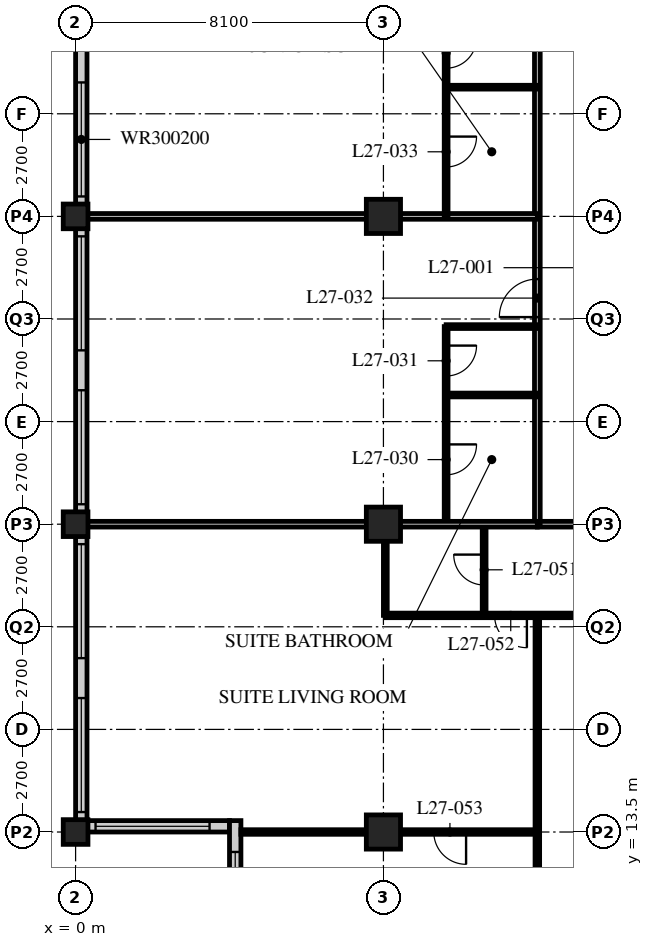
"""IFC4 building model, lengths in metres.
Left out: names, types, materials, properties, quantities, classifications, styles, units other than length and angle.
Written with IfcOpenShell. Run it as: python <this file> out.ifc"""

import sys

from ifc_helpers import new_model, si_unit, direction, frame, frame_2d, origin, origin_2d, place, context, subcontext, project, spatial, rectangle, hollow_rectangle, extrude, element, fill, save


model = new_model("IFC4")
c1 = context("Model", 3, precision=1e-05, world=origin(), true_north=direction((0.0, 1.0)))
c2 = subcontext(c1, "Body", "Model", "MODEL_VIEW")
j1 = project(units=[si_unit("LENGTHUNIT", "METRE"), si_unit("PLANEANGLEUNIT", "RADIAN")], contexts=[c1])
p1 = place(None, origin())
s1 = spatial("IfcSite", under=j1, at=p1, CompositionType="ELEMENT")
p2 = place(p1, origin())
s2 = spatial("IfcBuilding", under=s1, at=p2, CompositionType="ELEMENT")
p3 = place(p2, frame((0.0, 0.0, 110.2)))
s3 = spatial("IfcBuildingStorey", under=s2, at=p3, CompositionType="ELEMENT", Elevation=110.2)
for number, where, z_axis, x_axis in (
    (1, (0.0, 13.5, 0.0), (0.0, 0.0, 1.0), (1.0, 0.0, 0.0)),
    (2, (0.0, 21.6, 0.0), (0.0, 0.0, 1.0), (1.0, 0.0, 0.0)),
    (3, (0.0, 29.7, 0.0), (0.0, 0.0, 1.0), (1.0, 0.0, 0.0)),
):
    element("IfcColumn", number, at=place(p3, frame(where, z_axis=z_axis, x_axis=x_axis)), inside=s3, PredefinedType="COLUMN", context=c2, shape_type="SweptSolid", body=[
        extrude(hollow_rectangle(XDim=0.65, YDim=0.65, WallThickness=0.055, at=origin_2d()), origin(), (0.0, 0.0, 1.0), 3.4),
    ])
for number, where, z_axis, x_axis in (
    (4, (8.1, 13.5, 0.0), (0.0, 0.0, 1.0), (1.0, 0.0, 0.0)),
    (5, (8.1, 21.6, 0.0), (0.0, 0.0, 1.0), (1.0, 0.0, 0.0)),
    (6, (8.1, 29.7, 0.0), (0.0, 0.0, 1.0), (1.0, 0.0, 0.0)),
):
    element("IfcColumn", number, at=place(p3, frame(where, z_axis=z_axis, x_axis=x_axis)), inside=s3, PredefinedType="COLUMN", context=c2, shape_type="SweptSolid", body=[
        extrude(hollow_rectangle(XDim=0.9, YDim=0.9, WallThickness=0.09, at=origin_2d()), origin(), (0.0, 0.0, 1.0), 3.4),
    ])
p4 = place(p3, frame((0.15, 45.6, 0.0), z_axis=(0.0, 0.0, 1.0), x_axis=(0.0, -1.0, 0.0)))
e7 = element("IfcWall", 7, at=p4, inside=s3, PredefinedType="SOLIDWALL", context=c2, shape_type="SweptSolid", body=[
    extrude(rectangle(XDim=32.1, YDim=0.3, at=frame_2d((16.05, 0.0))), origin(), (0.0, 0.0, 1.0), 3.19),
])
p5 = place(p4, frame((0.225, 0.0, 0.9)))
e8 = element("IfcOpeningElement", 8, at=p5, cuts=e7, PredefinedType="OPENING", context=c2, shape_type="SweptSolid", body=[
    extrude(rectangle(XDim=3.0, YDim=2.0, at=frame_2d((1.5, 1.0))), frame((0.0, 0.16, 0.0), z_axis=(0.0, -1.0, 0.0), x_axis=(1.0, 0.0, 0.0)), (0.0, 0.0, 1.0), 0.32),
])
p6 = place(p4, frame((4.275, 0.0, 0.9)))
e9 = element("IfcOpeningElement", 9, at=p6, cuts=e7, PredefinedType="OPENING", context=c2, shape_type="SweptSolid", body=[
    extrude(rectangle(XDim=3.0, YDim=2.0, at=frame_2d((1.5, 1.0))), frame((0.0, 0.16, 0.0), z_axis=(0.0, -1.0, 0.0), x_axis=(1.0, 0.0, 0.0)), (0.0, 0.0, 1.0), 0.32),
])
p7 = place(p4, frame((8.325, 0.0, 0.9)))
e10 = element("IfcOpeningElement", 10, at=p7, cuts=e7, PredefinedType="OPENING", context=c2, shape_type="SweptSolid", body=[
    extrude(rectangle(XDim=3.0, YDim=2.0, at=frame_2d((1.5, 1.0))), frame((0.0, 0.16, 0.0), z_axis=(0.0, -1.0, 0.0), x_axis=(1.0, 0.0, 0.0)), (0.0, 0.0, 1.0), 0.32),
])
p8 = place(p4, frame((12.375, 0.0, 0.9)))
e11 = element("IfcOpeningElement", 11, at=p8, cuts=e7, PredefinedType="OPENING", context=c2, shape_type="SweptSolid", body=[
    extrude(rectangle(XDim=3.0, YDim=2.0, at=frame_2d((1.5, 1.0))), frame((0.0, 0.16, 0.0), z_axis=(0.0, -1.0, 0.0), x_axis=(1.0, 0.0, 0.0)), (0.0, 0.0, 1.0), 0.32),
])
p9 = place(p4, frame((16.425, 0.0, 0.9)))
e12 = element("IfcOpeningElement", 12, at=p9, cuts=e7, PredefinedType="OPENING", context=c2, shape_type="SweptSolid", body=[
    extrude(rectangle(XDim=3.0, YDim=2.0, at=frame_2d((1.5, 1.0))), frame((0.0, 0.16, 0.0), z_axis=(0.0, -1.0, 0.0), x_axis=(1.0, 0.0, 0.0)), (0.0, 0.0, 1.0), 0.32),
])
p10 = place(p4, frame((20.475, 0.0, 0.9)))
e13 = element("IfcOpeningElement", 13, at=p10, cuts=e7, PredefinedType="OPENING", context=c2, shape_type="SweptSolid", body=[
    extrude(rectangle(XDim=3.0, YDim=2.0, at=frame_2d((1.5, 1.0))), frame((0.0, 0.16, 0.0), z_axis=(0.0, -1.0, 0.0), x_axis=(1.0, 0.0, 0.0)), (0.0, 0.0, 1.0), 0.32),
])
p11 = place(p4, frame((24.525, 0.0, 0.9)))
e14 = element("IfcOpeningElement", 14, at=p11, cuts=e7, PredefinedType="OPENING", context=c2, shape_type="SweptSolid", body=[
    extrude(rectangle(XDim=3.0, YDim=2.0, at=frame_2d((1.5, 1.0))), frame((0.0, 0.16, 0.0), z_axis=(0.0, -1.0, 0.0), x_axis=(1.0, 0.0, 0.0)), (0.0, 0.0, 1.0), 0.32),
])
p12 = place(p4, frame((28.575, 0.0, 0.9)))
e15 = element("IfcOpeningElement", 15, at=p12, cuts=e7, PredefinedType="OPENING", context=c2, shape_type="SweptSolid", body=[
    extrude(rectangle(XDim=3.0, YDim=2.0, at=frame_2d((1.5, 1.0))), frame((0.0, 0.16, 0.0), z_axis=(0.0, -1.0, 0.0), x_axis=(1.0, 0.0, 0.0)), (0.0, 0.0, 1.0), 0.32),
])
p13 = place(p3, frame((0.3, 13.65, 0.0), z_axis=(0.0, 0.0, 1.0), x_axis=(1.0, 0.0, 0.0)))
e16 = element("IfcWall", 16, at=p13, inside=s3, PredefinedType="SOLIDWALL", context=c2, shape_type="SweptSolid", body=[
    extrude(rectangle(XDim=3.75, YDim=0.3, at=frame_2d((1.875, 0.0))), origin(), (0.0, 0.0, 1.0), 3.19),
])
p14 = place(p13, frame((0.225, 0.0, 0.9)))
e17 = element("IfcOpeningElement", 17, at=p14, cuts=e16, PredefinedType="OPENING", context=c2, shape_type="SweptSolid", body=[
    extrude(rectangle(XDim=3.0, YDim=1.5, at=frame_2d((1.5, 0.75))), frame((0.0, 0.16, 0.0), z_axis=(0.0, -1.0, 0.0), x_axis=(1.0, 0.0, 0.0)), (0.0, 0.0, 1.0), 0.32),
])
p15 = place(p3, frame((4.2, 13.8, 0.0), z_axis=(0.0, 0.0, 1.0), x_axis=(0.0, -1.0, 0.0)))
e18 = element("IfcWall", 18, at=p15, inside=s3, PredefinedType="SOLIDWALL", context=c2, shape_type="SweptSolid", body=[
    extrude(rectangle(XDim=4.35, YDim=0.3, at=frame_2d((2.175, 0.0))), origin(), (0.0, 0.0, 1.0), 3.19),
])
p16 = place(p15, frame((0.825, 0.0, 0.9)))
e19 = element("IfcOpeningElement", 19, at=p16, cuts=e18, PredefinedType="OPENING", context=c2, shape_type="SweptSolid", body=[
    extrude(rectangle(XDim=3.0, YDim=1.5, at=frame_2d((1.5, 0.75))), frame((0.0, 0.16, 0.0), z_axis=(0.0, -1.0, 0.0), x_axis=(1.0, 0.0, 0.0)), (0.0, 0.0, 1.0), 0.32),
])
p17 = place(p3, frame((12.15, 21.6, 0.0), z_axis=(0.0, 0.0, 1.0), x_axis=(1.0, 0.0, 0.0)))
e20 = element("IfcWall", 20, at=p17, inside=s3, PredefinedType="PARTITIONING", context=c2, shape_type="SweptSolid", body=[
    extrude(rectangle(XDim=32.4, YDim=0.15, at=frame_2d((16.2, 0.0))), origin(), (0.0, 0.0, 1.0), 2.578),
])
p18 = place(p17, frame((5.95, 0.0, 0.0)))
e21 = element("IfcOpeningElement", 21, at=p18, cuts=e20, PredefinedType="OPENING", context=c2, shape_type="SweptSolid", body=[
    extrude(rectangle(XDim=1.0, YDim=2.1, at=frame_2d((0.5, 1.05))), frame((0.0, 0.085, 0.0), z_axis=(0.0, -1.0, 0.0), x_axis=(1.0, 0.0, 0.0)), (0.0, 0.0, 1.0), 0.17),
])
p19 = place(p17, frame((14.05, 0.0, 0.0)))
e22 = element("IfcOpeningElement", 22, at=p19, cuts=e20, PredefinedType="OPENING", context=c2, shape_type="SweptSolid", body=[
    extrude(rectangle(XDim=1.0, YDim=2.1, at=frame_2d((0.5, 1.05))), frame((0.0, 0.085, 0.0), z_axis=(0.0, -1.0, 0.0), x_axis=(1.0, 0.0, 0.0)), (0.0, 0.0, 1.0), 0.17),
])
p20 = place(p17, frame((22.15, 0.0, 0.0)))
e23 = element("IfcOpeningElement", 23, at=p20, cuts=e20, PredefinedType="OPENING", context=c2, shape_type="SweptSolid", body=[
    extrude(rectangle(XDim=1.0, YDim=2.1, at=frame_2d((0.5, 1.05))), frame((0.0, 0.085, 0.0), z_axis=(0.0, -1.0, 0.0), x_axis=(1.0, 0.0, 0.0)), (0.0, 0.0, 1.0), 0.17),
])
p21 = place(p17, frame((1.525, 0.0, 0.0)))
e24 = element("IfcOpeningElement", 24, at=p21, cuts=e20, PredefinedType="OPENING", context=c2, shape_type="SweptSolid", body=[
    extrude(rectangle(XDim=1.0, YDim=2.1, at=frame_2d((0.5, 1.05))), frame((0.0, 0.085, 0.0), z_axis=(0.0, -1.0, 0.0), x_axis=(1.0, 0.0, 0.0)), (0.0, 0.0, 1.0), 0.17),
])
p22 = place(p17, frame((29.875, 0.0, 0.0)))
e25 = element("IfcOpeningElement", 25, at=p22, cuts=e20, PredefinedType="OPENING", context=c2, shape_type="SweptSolid", body=[
    extrude(rectangle(XDim=1.0, YDim=2.1, at=frame_2d((0.5, 1.05))), frame((0.0, 0.085, 0.0), z_axis=(0.0, -1.0, 0.0), x_axis=(1.0, 0.0, 0.0)), (0.0, 0.0, 1.0), 0.17),
])
p23 = place(p3, frame((12.15, 21.6, 0.0), z_axis=(0.0, 0.0, 1.0), x_axis=(0.0, 1.0, 0.0)))
e26 = element("IfcWall", 26, at=p23, inside=s3, PredefinedType="PARTITIONING", context=c2, shape_type="SweptSolid", body=[
    extrude(rectangle(XDim=24.3, YDim=0.15, at=frame_2d((12.15, 0.0))), origin(), (0.0, 0.0, 1.0), 3.19),
])
p24 = place(p23, frame((5.45, 0.0, 0.0)))
e27 = element("IfcOpeningElement", 27, at=p24, cuts=e26, PredefinedType="OPENING", context=c2, shape_type="SweptSolid", body=[
    extrude(rectangle(XDim=1.0, YDim=2.1, at=frame_2d((0.5, 1.05))), frame((0.0, 0.085, 0.0), z_axis=(0.0, -1.0, 0.0), x_axis=(1.0, 0.0, 0.0)), (0.0, 0.0, 1.0), 0.17),
])
p25 = place(p23, frame((13.55, 0.0, 0.0)))
e28 = element("IfcOpeningElement", 28, at=p25, cuts=e26, PredefinedType="OPENING", context=c2, shape_type="SweptSolid", body=[
    extrude(rectangle(XDim=1.0, YDim=2.1, at=frame_2d((0.5, 1.05))), frame((0.0, 0.085, 0.0), z_axis=(0.0, -1.0, 0.0), x_axis=(1.0, 0.0, 0.0)), (0.0, 0.0, 1.0), 0.17),
])
p26 = place(p23, frame((21.65, 0.0, 0.0)))
e29 = element("IfcOpeningElement", 29, at=p26, cuts=e26, PredefinedType="OPENING", context=c2, shape_type="SweptSolid", body=[
    extrude(rectangle(XDim=1.0, YDim=2.1, at=frame_2d((0.5, 1.05))), frame((0.0, 0.085, 0.0), z_axis=(0.0, -1.0, 0.0), x_axis=(1.0, 0.0, 0.0)), (0.0, 0.0, 1.0), 0.17),
])
p27 = place(p3, frame((9.75, 21.6, 0.0), z_axis=(0.0, 0.0, 1.0), x_axis=(0.0, 1.0, 0.0)))
e30 = element("IfcWall", 30, at=p27, inside=s3, PredefinedType="PARTITIONING", context=c2, shape_type="SweptSolid", body=[
    extrude(rectangle(XDim=5.2, YDim=0.1, at=frame_2d((2.6, 0.0))), origin(), (0.0, 0.0, 1.0), 3.19),
])
p28 = place(p27, frame((1.3, 0.0, 0.0)))
e31 = element("IfcOpeningElement", 31, at=p28, cuts=e30, PredefinedType="OPENING", context=c2, shape_type="SweptSolid", body=[
    extrude(rectangle(XDim=0.8, YDim=2.1, at=frame_2d((0.4, 1.05))), frame((0.0, 0.06, 0.0), z_axis=(0.0, -1.0, 0.0), x_axis=(1.0, 0.0, 0.0)), (0.0, 0.0, 1.0), 0.12),
])
p29 = place(p27, frame((3.9, 0.0, 0.0)))
e32 = element("IfcOpeningElement", 32, at=p29, cuts=e30, PredefinedType="OPENING", context=c2, shape_type="SweptSolid", body=[
    extrude(rectangle(XDim=0.8, YDim=2.1, at=frame_2d((0.4, 1.05))), frame((0.0, 0.06, 0.0), z_axis=(0.0, -1.0, 0.0), x_axis=(1.0, 0.0, 0.0)), (0.0, 0.0, 1.0), 0.12),
])
for number, where, z_axis, x_axis in (
    (33, (12.15, 25.0, 0.0), (0.0, 0.0, 1.0), (-1.0, 0.0, 0.0)),
    (34, (12.15, 26.8, 0.0), (0.0, 0.0, 1.0), (-1.0, 0.0, 0.0)),
):
    element("IfcWall", number, at=place(p3, frame(where, z_axis=z_axis, x_axis=x_axis)), inside=s3, PredefinedType="PARTITIONING", context=c2, shape_type="SweptSolid", body=[
        extrude(rectangle(XDim=2.4, YDim=0.1, at=frame_2d((1.2, 0.0))), origin(), (0.0, 0.0, 1.0), 3.19),
    ])
p30 = place(p3, frame((12.15, 29.7, 0.0), z_axis=(0.0, 0.0, 1.0), x_axis=(-1.0, 0.0, 0.0)))
e35 = element("IfcWall", 35, at=p30, inside=s3, PredefinedType="PARTITIONING", context=c2, shape_type="SweptSolid", body=[
    extrude(rectangle(XDim=11.85, YDim=0.15, at=frame_2d((5.925, 0.0))), origin(), (0.0, 0.0, 1.0), 2.578),
])
p31 = place(p3, frame((9.75, 29.7, 0.0), z_axis=(0.0, 0.0, 1.0), x_axis=(0.0, 1.0, 0.0)))
e36 = element("IfcWall", 36, at=p31, inside=s3, PredefinedType="PARTITIONING", context=c2, shape_type="SweptSolid", body=[
    extrude(rectangle(XDim=5.2, YDim=0.1, at=frame_2d((2.6, 0.0))), origin(), (0.0, 0.0, 1.0), 3.19),
])
p32 = place(p31, frame((1.3, 0.0, 0.0)))
e37 = element("IfcOpeningElement", 37, at=p32, cuts=e36, PredefinedType="OPENING", context=c2, shape_type="SweptSolid", body=[
    extrude(rectangle(XDim=0.8, YDim=2.1, at=frame_2d((0.4, 1.05))), frame((0.0, 0.06, 0.0), z_axis=(0.0, -1.0, 0.0), x_axis=(1.0, 0.0, 0.0)), (0.0, 0.0, 1.0), 0.12),
])
p33 = place(p31, frame((3.9, 0.0, 0.0)))
e38 = element("IfcOpeningElement", 38, at=p33, cuts=e36, PredefinedType="OPENING", context=c2, shape_type="SweptSolid", body=[
    extrude(rectangle(XDim=0.8, YDim=2.1, at=frame_2d((0.4, 1.05))), frame((0.0, 0.06, 0.0), z_axis=(0.0, -1.0, 0.0), x_axis=(1.0, 0.0, 0.0)), (0.0, 0.0, 1.0), 0.12),
])
p34 = place(p3, frame((12.15, 33.1, 0.0), z_axis=(0.0, 0.0, 1.0), x_axis=(-1.0, 0.0, 0.0)))
e39 = element("IfcWall", 39, at=p34, inside=s3, PredefinedType="PARTITIONING", context=c2, shape_type="SweptSolid", body=[
    extrude(rectangle(XDim=2.4, YDim=0.1, at=frame_2d((1.2, 0.0))), origin(), (0.0, 0.0, 1.0), 3.19),
])
p35 = place(p3, frame((10.75, 21.6, 0.0), z_axis=(0.0, 0.0, 1.0), x_axis=(0.0, -1.0, 0.0)))
e40 = element("IfcWall", 40, at=p35, inside=s3, PredefinedType="PARTITIONING", context=c2, shape_type="SweptSolid", body=[
    extrude(rectangle(XDim=2.4, YDim=0.1, at=frame_2d((1.2, 0.0))), origin(), (0.0, 0.0, 1.0), 3.19),
])
p36 = place(p35, frame((0.8, 0.0, 0.0)))
e41 = element("IfcOpeningElement", 41, at=p36, cuts=e40, PredefinedType="OPENING", context=c2, shape_type="SweptSolid", body=[
    extrude(rectangle(XDim=0.8, YDim=2.1, at=frame_2d((0.4, 1.05))), frame((0.0, 0.06, 0.0), z_axis=(0.0, -1.0, 0.0), x_axis=(1.0, 0.0, 0.0)), (0.0, 0.0, 1.0), 0.12),
])
p37 = place(p3, frame((8.15, 21.6, 0.0), z_axis=(0.0, 0.0, 1.0), x_axis=(0.0, -1.0, 0.0)))
e42 = element("IfcWall", 42, at=p37, inside=s3, PredefinedType="PARTITIONING", context=c2, shape_type="SweptSolid", body=[
    extrude(rectangle(XDim=2.4, YDim=0.1, at=frame_2d((1.2, 0.0))), origin(), (0.0, 0.0, 1.0), 2.578),
])
p38 = place(p3, frame((8.15, 19.2, 0.0), z_axis=(0.0, 0.0, 1.0), x_axis=(1.0, 0.0, 0.0)))
e43 = element("IfcWall", 43, at=p38, inside=s3, PredefinedType="PARTITIONING", context=c2, shape_type="SweptSolid", body=[
    extrude(rectangle(XDim=8.05, YDim=0.12, at=frame_2d((4.025, 0.0))), origin(), (0.0, 0.0, 1.0), 3.19),
])
p39 = place(p38, frame((6.725, 0.0, 0.0)))
e44 = element("IfcOpeningElement", 44, at=p39, cuts=e43, PredefinedType="OPENING", context=c2, shape_type="SweptSolid", body=[
    extrude(rectangle(XDim=0.85, YDim=2.1, at=frame_2d((0.425, 1.05))), frame((0.0, 0.07, 0.0), z_axis=(0.0, -1.0, 0.0), x_axis=(1.0, 0.0, 0.0)), (0.0, 0.0, 1.0), 0.14),
])
p40 = place(p38, frame((2.875, 0.0, 0.0)))
e45 = element("IfcOpeningElement", 45, at=p40, cuts=e43, PredefinedType="OPENING", context=c2, shape_type="SweptSolid", body=[
    extrude(rectangle(XDim=0.85, YDim=2.1, at=frame_2d((0.425, 1.05))), frame((0.0, 0.07, 0.0), z_axis=(0.0, -1.0, 0.0), x_axis=(1.0, 0.0, 0.0)), (0.0, 0.0, 1.0), 0.14),
])
p41 = place(p3, frame((12.15, 19.2, 0.0), z_axis=(0.0, 0.0, 1.0), x_axis=(0.0, -1.0, 0.0)))
e46 = element("IfcWall", 46, at=p41, inside=s3, PredefinedType="PARTITIONING", context=c2, shape_type="SweptSolid", body=[
    extrude(rectangle(XDim=13.5, YDim=0.12, at=frame_2d((6.75, 0.0))), origin(), (0.0, 0.0, 1.0), 3.19),
])
p42 = place(p3, frame((12.15, 13.5, 0.0), z_axis=(0.0, 0.0, 1.0), x_axis=(-1.0, 0.0, 0.0)))
e47 = element("IfcWall", 47, at=p42, inside=s3, PredefinedType="PARTITIONING", context=c2, shape_type="SweptSolid", body=[
    extrude(rectangle(XDim=7.8, YDim=0.12, at=frame_2d((3.9, 0.0))), origin(), (0.0, 0.0, 1.0), 2.578),
])
p43 = place(p42, frame((1.875, 0.0, 0.0)))
e48 = element("IfcOpeningElement", 48, at=p43, cuts=e47, PredefinedType="OPENING", context=c2, shape_type="SweptSolid", body=[
    extrude(rectangle(XDim=0.85, YDim=2.1, at=frame_2d((0.425, 1.05))), frame((0.0, 0.07, 0.0), z_axis=(0.0, -1.0, 0.0), x_axis=(1.0, 0.0, 0.0)), (0.0, 0.0, 1.0), 0.14),
])
p44 = place(p3, frame((0.3, 21.6, 0.0), z_axis=(0.0, 0.0, 1.0), x_axis=(1.0, 0.0, 0.0)))
e49 = element("IfcWall", 49, at=p44, inside=s3, PredefinedType="PARTITIONING", context=c2, shape_type="SweptSolid", body=[
    extrude(rectangle(XDim=11.85, YDim=0.15, at=frame_2d((5.925, 0.0))), origin(), (0.0, 0.0, 1.0), 2.578),
])
p45 = place(p8, origin())
e50 = element("IfcWindow", 50, at=p45, inside=s3, PartitioningType="SINGLE_PANEL", PredefinedType="WINDOW", context=c2, shape_type="SweptSolid", body=[
    extrude(rectangle(XDim=3.0, YDim=2.0, at=frame_2d((1.5, 1.0))), frame((0.0, 0.03, 0.0), z_axis=(0.0, -1.0, 0.0), x_axis=(1.0, 0.0, 0.0)), (0.0, 0.0, 1.0), 0.06),
])
fill(e11, e50)
p46 = place(p9, origin())
e51 = element("IfcWindow", 51, at=p46, inside=s3, PartitioningType="SINGLE_PANEL", PredefinedType="WINDOW", context=c2, shape_type="SweptSolid", body=[
    extrude(rectangle(XDim=3.0, YDim=2.0, at=frame_2d((1.5, 1.0))), frame((0.0, 0.03, 0.0), z_axis=(0.0, -1.0, 0.0), x_axis=(1.0, 0.0, 0.0)), (0.0, 0.0, 1.0), 0.06),
])
fill(e12, e51)
p47 = place(p10, origin())
e52 = element("IfcWindow", 52, at=p47, inside=s3, PartitioningType="SINGLE_PANEL", PredefinedType="WINDOW", context=c2, shape_type="SweptSolid", body=[
    extrude(rectangle(XDim=3.0, YDim=2.0, at=frame_2d((1.5, 1.0))), frame((0.0, 0.03, 0.0), z_axis=(0.0, -1.0, 0.0), x_axis=(1.0, 0.0, 0.0)), (0.0, 0.0, 1.0), 0.06),
])
fill(e13, e52)
p48 = place(p11, origin())
e53 = element("IfcWindow", 53, at=p48, inside=s3, PartitioningType="SINGLE_PANEL", PredefinedType="WINDOW", context=c2, shape_type="SweptSolid", body=[
    extrude(rectangle(XDim=3.0, YDim=2.0, at=frame_2d((1.5, 1.0))), frame((0.0, 0.03, 0.0), z_axis=(0.0, -1.0, 0.0), x_axis=(1.0, 0.0, 0.0)), (0.0, 0.0, 1.0), 0.06),
])
fill(e14, e53)
p49 = place(p12, origin())
e54 = element("IfcWindow", 54, at=p49, inside=s3, PartitioningType="SINGLE_PANEL", PredefinedType="WINDOW", context=c2, shape_type="SweptSolid", body=[
    extrude(rectangle(XDim=3.0, YDim=2.0, at=frame_2d((1.5, 1.0))), frame((0.0, 0.03, 0.0), z_axis=(0.0, -1.0, 0.0), x_axis=(1.0, 0.0, 0.0)), (0.0, 0.0, 1.0), 0.06),
])
fill(e15, e54)
p50 = place(p14, origin())
e55 = element("IfcWindow", 55, at=p50, inside=s3, PartitioningType="SINGLE_PANEL", PredefinedType="WINDOW", context=c2, shape_type="SweptSolid", body=[
    extrude(rectangle(XDim=3.0, YDim=1.5, at=frame_2d((1.5, 0.75))), frame((0.0, 0.03, 0.0), z_axis=(0.0, -1.0, 0.0), x_axis=(1.0, 0.0, 0.0)), (0.0, 0.0, 1.0), 0.06),
])
fill(e17, e55)
p51 = place(p16, origin())
e56 = element("IfcWindow", 56, at=p51, inside=s3, PartitioningType="SINGLE_PANEL", PredefinedType="WINDOW", context=c2, shape_type="SweptSolid", body=[
    extrude(rectangle(XDim=3.0, YDim=1.5, at=frame_2d((1.5, 0.75))), frame((0.0, 0.03, 0.0), z_axis=(0.0, -1.0, 0.0), x_axis=(1.0, 0.0, 0.0)), (0.0, 0.0, 1.0), 0.06),
])
fill(e19, e56)
p52 = place(p28, origin())
e57 = element("IfcDoor", 57, at=p52, inside=s3, OperationType="SINGLE_SWING_LEFT", PredefinedType="DOOR", context=c2, shape_type="SweptSolid", body=[
    extrude(rectangle(XDim=0.8, YDim=2.1, at=frame_2d((0.4, 1.05))), frame((0.0, 0.025, 0.0), z_axis=(0.0, -1.0, 0.0), x_axis=(1.0, 0.0, 0.0)), (0.0, 0.0, 1.0), 0.05),
])
fill(e31, e57)
p53 = place(p29, origin())
e58 = element("IfcDoor", 58, at=p53, inside=s3, OperationType="SINGLE_SWING_LEFT", PredefinedType="DOOR", context=c2, shape_type="SweptSolid", body=[
    extrude(rectangle(XDim=0.8, YDim=2.1, at=frame_2d((0.4, 1.05))), frame((0.0, 0.025, 0.0), z_axis=(0.0, -1.0, 0.0), x_axis=(1.0, 0.0, 0.0)), (0.0, 0.0, 1.0), 0.05),
])
fill(e32, e58)
p54 = place(p24, origin())
e59 = element("IfcDoor", 59, at=p54, inside=s3, OperationType="SINGLE_SWING_LEFT", PredefinedType="DOOR", context=c2, shape_type="SweptSolid", body=[
    extrude(rectangle(XDim=1.0, YDim=2.1, at=frame_2d((0.5, 1.05))), frame((0.0, 0.025, 0.0), z_axis=(0.0, -1.0, 0.0), x_axis=(1.0, 0.0, 0.0)), (0.0, 0.0, 1.0), 0.05),
])
fill(e27, e59)
p55 = place(p32, origin())
e60 = element("IfcDoor", 60, at=p55, inside=s3, OperationType="SINGLE_SWING_LEFT", PredefinedType="DOOR", context=c2, shape_type="SweptSolid", body=[
    extrude(rectangle(XDim=0.8, YDim=2.1, at=frame_2d((0.4, 1.05))), frame((0.0, 0.025, 0.0), z_axis=(0.0, -1.0, 0.0), x_axis=(1.0, 0.0, 0.0)), (0.0, 0.0, 1.0), 0.05),
])
fill(e37, e60)
p56 = place(p33, origin())
e61 = element("IfcDoor", 61, at=p56, inside=s3, OperationType="SINGLE_SWING_LEFT", PredefinedType="DOOR", context=c2, shape_type="SweptSolid", body=[
    extrude(rectangle(XDim=0.8, YDim=2.1, at=frame_2d((0.4, 1.05))), frame((0.0, 0.025, 0.0), z_axis=(0.0, -1.0, 0.0), x_axis=(1.0, 0.0, 0.0)), (0.0, 0.0, 1.0), 0.05),
])
fill(e38, e61)
p57 = place(p36, origin())
e62 = element("IfcDoor", 62, at=p57, inside=s3, OperationType="SINGLE_SWING_RIGHT", PredefinedType="DOOR", context=c2, shape_type="SweptSolid", body=[
    extrude(rectangle(XDim=0.8, YDim=2.1, at=frame_2d((0.4, 1.05))), frame((0.0, 0.025, 0.0), z_axis=(0.0, -1.0, 0.0), x_axis=(1.0, 0.0, 0.0)), (0.0, 0.0, 1.0), 0.05),
])
fill(e41, e62)
p58 = place(p40, origin())
e63 = element("IfcDoor", 63, at=p58, inside=s3, OperationType="SINGLE_SWING_LEFT", PredefinedType="DOOR", context=c2, shape_type="SweptSolid", body=[
    extrude(rectangle(XDim=0.85, YDim=2.1, at=frame_2d((0.425, 1.05))), frame((0.0, 0.025, 0.0), z_axis=(0.0, -1.0, 0.0), x_axis=(1.0, 0.0, 0.0)), (0.0, 0.0, 1.0), 0.05),
])
fill(e45, e63)
p59 = place(p43, origin())
e64 = element("IfcDoor", 64, at=p59, inside=s3, OperationType="SINGLE_SWING_LEFT", PredefinedType="DOOR", context=c2, shape_type="SweptSolid", body=[
    extrude(rectangle(XDim=0.85, YDim=2.1, at=frame_2d((0.425, 1.05))), frame((0.0, 0.025, 0.0), z_axis=(0.0, -1.0, 0.0), x_axis=(1.0, 0.0, 0.0)), (0.0, 0.0, 1.0), 0.05),
])
fill(e48, e64)
save(model, sys.argv[1])
